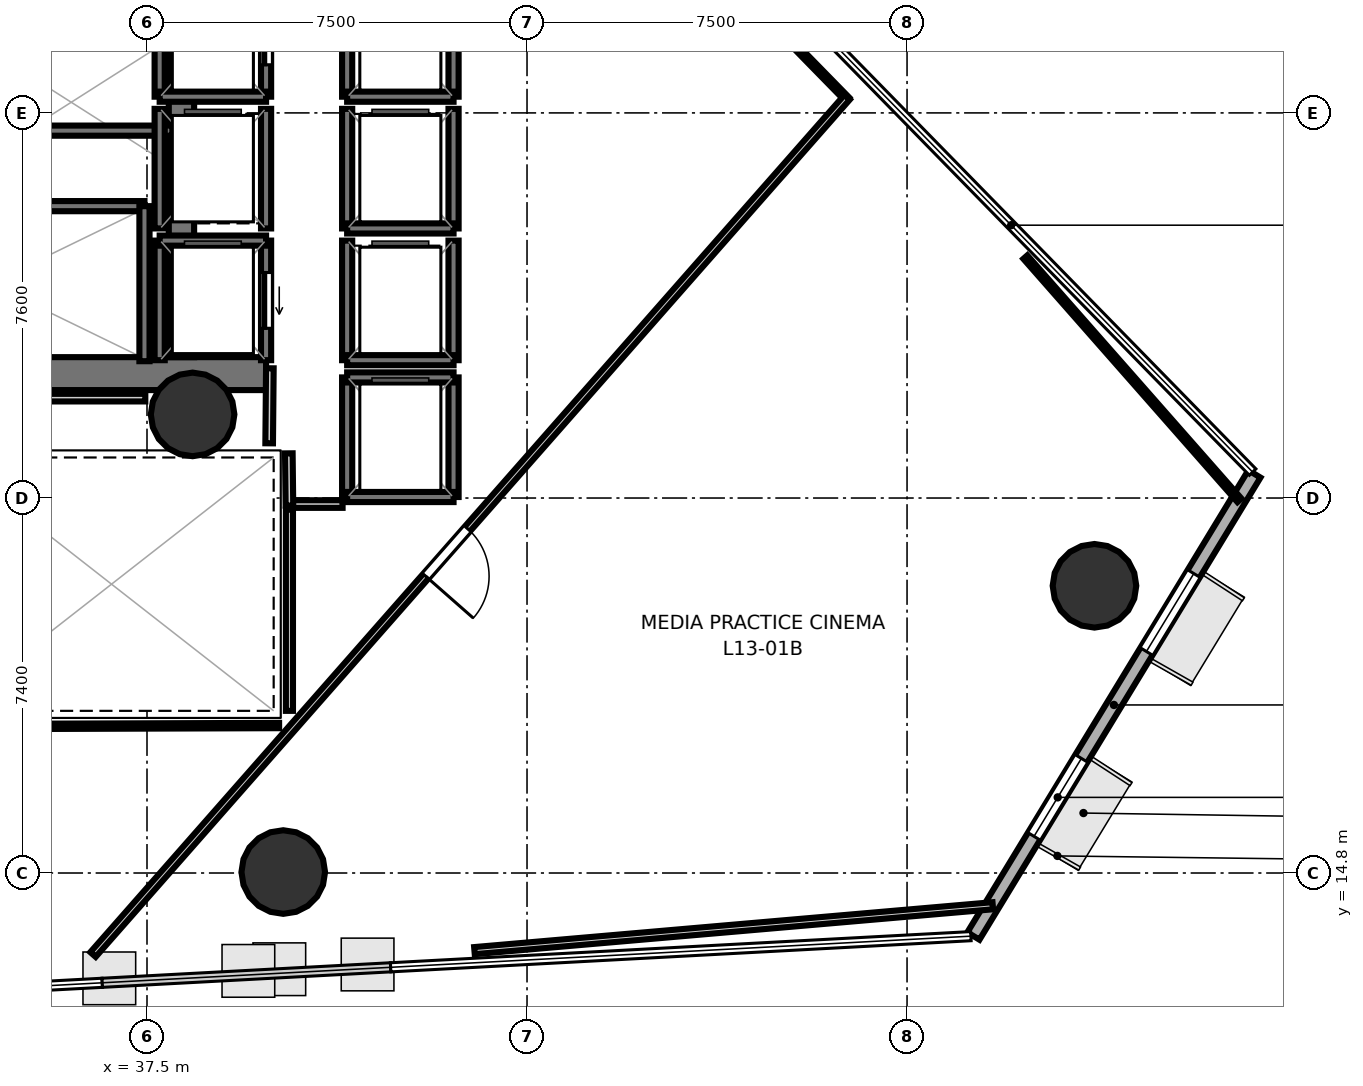
"""IFC4 building model, lengths in metres.
Left out: names, types, materials, properties, quantities, classifications, styles, units other than length and angle.
Written with IfcOpenShell. Run it as: python <this file> out.ifc"""

import sys

from ifc_helpers import new_model, si_unit, direction, frame, frame_2d, origin, origin_2d, place, context, subcontext, project, spatial, rectangle, hollow_circle, extrude, element, fill, save


model = new_model("IFC4")
c1 = context("Model", 3, precision=1e-05, world=origin(), true_north=direction((0.0, 1.0)))
c2 = subcontext(c1, "Body", "Model", "MODEL_VIEW")
j1 = project(units=[si_unit("LENGTHUNIT", "METRE"), si_unit("PLANEANGLEUNIT", "RADIAN")], contexts=[c1])
p1 = place(None, origin())
s1 = spatial("IfcSite", under=j1, at=p1, CompositionType="ELEMENT")
p2 = place(p1, origin())
s2 = spatial("IfcBuilding", under=s1, at=p2, CompositionType="ELEMENT")
p3 = place(p2, frame((0.0, 0.0, 56.2)))
s3 = spatial("IfcBuildingStorey", under=s2, at=p3, CompositionType="ELEMENT", Elevation=56.2)
p4 = place(p3, frame((29.13, 24.655, 0.0), z_axis=(0.0, 0.0, 1.0), x_axis=(1.0, 0.0, 0.0)))
e1 = element("IfcWall", 1, at=p4, inside=s3, PredefinedType="SHEAR", context=c2, shape_type="SweptSolid", body=[
    extrude(rectangle(XDim=10.72, YDim=0.65, at=frame_2d((5.36, 0.0))), origin(), (0.0, 0.0, 1.0), 3.52),
])
p5 = place(p4, frame((0.895, 0.0, 0.0)))
e2 = element("IfcOpeningElement", 2, at=p5, cuts=e1, PredefinedType="OPENING", context=c2, shape_type="SweptSolid", body=[
    extrude(rectangle(XDim=1.25, YDim=2.15, at=frame_2d((0.625, 1.075))), frame((0.0, 0.335, 0.0), z_axis=(0.0, -1.0, 0.0), x_axis=(1.0, 0.0, 0.0)), (0.0, 0.0, 1.0), 0.67),
])
p6 = place(p3, frame((38.18, 24.98, 0.0), z_axis=(0.0, 0.0, 1.0), x_axis=(0.0, 1.0, 0.0)))
e3 = element("IfcWall", 3, at=p6, inside=s3, PredefinedType="SHEAR", context=c2, shape_type="SweptSolid", body=[
    extrude(rectangle(XDim=7.44, YDim=0.5, at=frame_2d((3.72, 0.0))), origin(), (0.0, 0.0, 1.0), 3.52),
])
for number, where, z_axis, x_axis in (
    (4, (38.4, 23.85, 0.0), (0.0, 0.0, 1.0), (1.0, 0.0, 0.0)),
    (5, (56.199, 20.468, 0.0), (0.0, 0.0, 1.0), (1.0, 0.0, 0.0)),
    (6, (40.189, 14.819, 0.0), (0.0, 0.0, 1.0), (1.0, 0.0, 0.0)),
):
    element("IfcColumn", number, at=place(p3, frame(where, z_axis=z_axis, x_axis=x_axis)), inside=s3, PredefinedType="COLUMN", context=c2, shape_type="SweptSolid", body=[
        extrude(hollow_circle(Radius=0.825, WallThickness=0.04, at=origin_2d()), origin(), (0.0, 0.0, 1.0), 3.7),
    ])
p7 = place(p3, frame((53.81, 13.556, 0.0), z_axis=(0.0, 0.0, 1.0), x_axis=(0.51955578319, 0.854436532549, 0.0)))
e7 = element("IfcWall", 7, at=p7, inside=s3, PredefinedType="SOLIDWALL", context=c2, shape_type="SweptSolid", body=[
    extrude(rectangle(XDim=10.674, YDim=0.28, at=frame_2d((5.337, 0.0))), origin(), (0.0, 0.0, 1.0), 3.52),
])
p8 = place(p7, frame((2.302, 0.0, 0.85)))
e8 = element("IfcOpeningElement", 8, at=p8, cuts=e7, PredefinedType="OPENING", context=c2, shape_type="SweptSolid", body=[
    extrude(rectangle(XDim=1.8, YDim=2.1, at=frame_2d((0.9, 1.05))), frame((0.0, 0.15, 0.0), z_axis=(0.0, -1.0, 0.0), x_axis=(1.0, 0.0, 0.0)), (0.0, 0.0, 1.0), 0.3),
])
p9 = place(p7, frame((6.572, 0.0, 0.85)))
e9 = element("IfcOpeningElement", 9, at=p9, cuts=e7, PredefinedType="OPENING", context=c2, shape_type="SweptSolid", body=[
    extrude(rectangle(XDim=1.8, YDim=2.1, at=frame_2d((0.9, 1.05))), frame((0.0, 0.15, 0.0), z_axis=(0.0, -1.0, 0.0), x_axis=(1.0, 0.0, 0.0)), (0.0, 0.0, 1.0), 0.3),
])
p10 = place(p3, frame((29.7, 29.45, 0.0), z_axis=(0.0, 0.0, 1.0), x_axis=(1.0, 0.0, 0.0)))
e10 = element("IfcWall", 10, at=p10, inside=s3, PredefinedType="SOLIDWALL", context=c2, shape_type="SweptSolid", body=[
    extrude(rectangle(XDim=8.3, YDim=0.2, at=frame_2d((4.15, 0.0))), origin(), (0.0, 0.0, 1.0), 3.52),
])
p11 = place(p3, frame((29.7, 27.96, 0.0), z_axis=(0.0, 0.0, 1.0), x_axis=(1.0, 0.0, 0.0)))
e11 = element("IfcWall", 11, at=p11, inside=s3, PredefinedType="SOLIDWALL", context=c2, shape_type="SweptSolid", body=[
    extrude(rectangle(XDim=7.75, YDim=0.2, at=frame_2d((3.875, 0.0))), origin(), (0.0, 0.0, 1.0), 3.52),
])
p12 = place(p3, frame((37.45, 24.9, 0.0), z_axis=(0.0, 0.0, 1.0), x_axis=(0.0, 1.0, 0.0)))
e12 = element("IfcWall", 12, at=p12, inside=s3, PredefinedType="SOLIDWALL", context=c2, shape_type="SweptSolid", body=[
    extrude(rectangle(XDim=3.06, YDim=0.2, at=frame_2d((1.53, 0.0))), origin(), (0.0, 0.0, 1.0), 3.52),
])
p13 = place(p3, frame((39.85, 30.12, 0.0), z_axis=(0.0, 0.0, 1.0), x_axis=(0.0, 1.0, 0.0)))
e13 = element("IfcWall", 13, at=p13, inside=s3, PredefinedType="SOLIDWALL", context=c2, shape_type="SweptSolid", body=[
    extrude(rectangle(XDim=2.36, YDim=0.2, at=frame_2d((1.18, 0.0))), origin(), (0.0, 0.0, 1.0), 3.52),
])
p14 = place(p13, frame((0.63, 0.0, 0.0)))
e14 = element("IfcOpeningElement", 14, at=p14, cuts=e13, PredefinedType="OPENING", context=c2, shape_type="SweptSolid", body=[
    extrude(rectangle(XDim=1.1, YDim=2.15, at=frame_2d((0.55, 1.075))), frame((0.0, 0.11, 0.0), z_axis=(0.0, -1.0, 0.0), x_axis=(1.0, 0.0, 0.0)), (0.0, 0.0, 1.0), 0.22),
])
p15 = place(p3, frame((37.75, 30.12, 0.0), z_axis=(0.0, 0.0, 1.0), x_axis=(0.0, 1.0, 0.0)))
e15 = element("IfcWall", 15, at=p15, inside=s3, PredefinedType="SOLIDWALL", context=c2, shape_type="SweptSolid", body=[
    extrude(rectangle(XDim=2.36, YDim=0.2, at=frame_2d((1.18, 0.0))), origin(), (0.0, 0.0, 1.0), 3.52),
])
p16 = place(p3, frame((37.75, 30.12, 0.0), z_axis=(0.0, 0.0, 1.0), x_axis=(1.0, 0.0, 0.0)))
e16 = element("IfcWall", 16, at=p16, inside=s3, PredefinedType="SOLIDWALL", context=c2, shape_type="SweptSolid", body=[
    extrude(rectangle(XDim=2.1, YDim=0.2, at=frame_2d((1.05, 0.0))), origin(), (0.0, 0.0, 1.0), 3.52),
])
p17 = place(p3, frame((39.85, 24.92, 0.0), z_axis=(0.0, 0.0, 1.0), x_axis=(0.0, 1.0, 0.0)))
e17 = element("IfcWall", 17, at=p17, inside=s3, PredefinedType="SOLIDWALL", context=c2, shape_type="SweptSolid", body=[
    extrude(rectangle(XDim=2.36, YDim=0.2, at=frame_2d((1.18, 0.0))), origin(), (0.0, 0.0, 1.0), 3.52),
])
p18 = place(p17, frame((0.63, 0.0, 0.0)))
e18 = element("IfcOpeningElement", 18, at=p18, cuts=e17, PredefinedType="OPENING", context=c2, shape_type="SweptSolid", body=[
    extrude(rectangle(XDim=1.1, YDim=2.15, at=frame_2d((0.55, 1.075))), frame((0.0, 0.11, 0.0), z_axis=(0.0, -1.0, 0.0), x_axis=(1.0, 0.0, 0.0)), (0.0, 0.0, 1.0), 0.22),
])
p19 = place(p3, frame((37.75, 24.92, 0.0), z_axis=(0.0, 0.0, 1.0), x_axis=(0.0, 1.0, 0.0)))
e19 = element("IfcWall", 19, at=p19, inside=s3, PredefinedType="SOLIDWALL", context=c2, shape_type="SweptSolid", body=[
    extrude(rectangle(XDim=2.36, YDim=0.2, at=frame_2d((1.18, 0.0))), origin(), (0.0, 0.0, 1.0), 3.52),
])
p20 = place(p3, frame((37.75, 27.28, 0.0), z_axis=(0.0, 0.0, 1.0), x_axis=(1.0, 0.0, 0.0)))
e20 = element("IfcWall", 20, at=p20, inside=s3, PredefinedType="SOLIDWALL", context=c2, shape_type="SweptSolid", body=[
    extrude(rectangle(XDim=2.1, YDim=0.2, at=frame_2d((1.05, 0.0))), origin(), (0.0, 0.0, 1.0), 3.52),
])
for number, where, z_axis, x_axis in (
    (21, (43.55, 30.12, 0.0), (0.0, 0.0, 1.0), (0.0, 1.0, 0.0)),
    (22, (41.45, 30.12, 0.0), (0.0, 0.0, 1.0), (0.0, 1.0, 0.0)),
):
    element("IfcWall", number, at=place(p3, frame(where, z_axis=z_axis, x_axis=x_axis)), inside=s3, PredefinedType="SOLIDWALL", context=c2, shape_type="SweptSolid", body=[
        extrude(rectangle(XDim=2.36, YDim=0.2, at=frame_2d((1.18, 0.0))), origin(), (0.0, 0.0, 1.0), 3.52),
    ])
p21 = place(p3, frame((41.45, 30.12, 0.0), z_axis=(0.0, 0.0, 1.0), x_axis=(1.0, 0.0, 0.0)))
e23 = element("IfcWall", 23, at=p21, inside=s3, PredefinedType="SOLIDWALL", context=c2, shape_type="SweptSolid", body=[
    extrude(rectangle(XDim=2.1, YDim=0.2, at=frame_2d((1.05, 0.0))), origin(), (0.0, 0.0, 1.0), 3.52),
])
for number, where, z_axis, x_axis in (
    (24, (43.55, 27.52, 0.0), (0.0, 0.0, 1.0), (0.0, 1.0, 0.0)),
    (25, (41.45, 27.52, 0.0), (0.0, 0.0, 1.0), (0.0, 1.0, 0.0)),
):
    element("IfcWall", number, at=place(p3, frame(where, z_axis=z_axis, x_axis=x_axis)), inside=s3, PredefinedType="SOLIDWALL", context=c2, shape_type="SweptSolid", body=[
        extrude(rectangle(XDim=2.36, YDim=0.2, at=frame_2d((1.18, 0.0))), origin(), (0.0, 0.0, 1.0), 3.52),
    ])
p22 = place(p3, frame((41.45, 27.52, 0.0), z_axis=(0.0, 0.0, 1.0), x_axis=(1.0, 0.0, 0.0)))
e26 = element("IfcWall", 26, at=p22, inside=s3, PredefinedType="SOLIDWALL", context=c2, shape_type="SweptSolid", body=[
    extrude(rectangle(XDim=2.1, YDim=0.2, at=frame_2d((1.05, 0.0))), origin(), (0.0, 0.0, 1.0), 3.52),
])
for number, where, z_axis, x_axis in (
    (27, (43.55, 24.92, 0.0), (0.0, 0.0, 1.0), (0.0, 1.0, 0.0)),
    (28, (41.45, 24.92, 0.0), (0.0, 0.0, 1.0), (0.0, 1.0, 0.0)),
):
    element("IfcWall", number, at=place(p3, frame(where, z_axis=z_axis, x_axis=x_axis)), inside=s3, PredefinedType="SOLIDWALL", context=c2, shape_type="SweptSolid", body=[
        extrude(rectangle(XDim=2.36, YDim=0.2, at=frame_2d((1.18, 0.0))), origin(), (0.0, 0.0, 1.0), 3.52),
    ])
p23 = place(p3, frame((41.45, 24.92, 0.0), z_axis=(0.0, 0.0, 1.0), x_axis=(1.0, 0.0, 0.0)))
e29 = element("IfcWall", 29, at=p23, inside=s3, PredefinedType="SOLIDWALL", context=c2, shape_type="SweptSolid", body=[
    extrude(rectangle(XDim=2.1, YDim=0.2, at=frame_2d((1.05, 0.0))), origin(), (0.0, 0.0, 1.0), 3.52),
])
for number, where, z_axis, x_axis in (
    (30, (39.85, 27.52, 0.0), (0.0, 0.0, 1.0), (0.0, 1.0, 0.0)),
    (31, (37.75, 27.52, 0.0), (0.0, 0.0, 1.0), (0.0, 1.0, 0.0)),
):
    element("IfcWall", number, at=place(p3, frame(where, z_axis=z_axis, x_axis=x_axis)), inside=s3, PredefinedType="SOLIDWALL", context=c2, shape_type="SweptSolid", body=[
        extrude(rectangle(XDim=2.36, YDim=0.2, at=frame_2d((1.18, 0.0))), origin(), (0.0, 0.0, 1.0), 3.52),
    ])
for number, where, z_axis, x_axis in (
    (32, (43.55, 22.22, 0.0), (0.0, 0.0, 1.0), (0.0, 1.0, 0.0)),
    (33, (41.45, 22.22, 0.0), (0.0, 0.0, 1.0), (0.0, 1.0, 0.0)),
):
    element("IfcWall", number, at=place(p3, frame(where, z_axis=z_axis, x_axis=x_axis)), inside=s3, PredefinedType="SOLIDWALL", context=c2, shape_type="SweptSolid", body=[
        extrude(rectangle(XDim=2.36, YDim=0.2, at=frame_2d((1.18, 0.0))), origin(), (0.0, 0.0, 1.0), 3.52),
    ])
for number, where, z_axis, x_axis in (
    (34, (41.45, 24.58, 0.0), (0.0, 0.0, 1.0), (1.0, 0.0, 0.0)),
    (35, (41.45, 22.22, 0.0), (0.0, 0.0, 1.0), (1.0, 0.0, 0.0)),
):
    element("IfcWall", number, at=place(p3, frame(where, z_axis=z_axis, x_axis=x_axis)), inside=s3, PredefinedType="SOLIDWALL", context=c2, shape_type="SweptSolid", body=[
        extrude(rectangle(XDim=2.1, YDim=0.2, at=frame_2d((1.05, 0.0))), origin(), (0.0, 0.0, 1.0), 3.52),
    ])
p24 = place(p3, frame((41.36, 22.081, 0.0), z_axis=(0.0, 0.0, 1.0), x_axis=(-1.0, 0.0, 0.0)))
e36 = element("IfcWall", 36, at=p24, inside=s3, PredefinedType="PARTITIONING", context=c2, shape_type="SweptSolid", body=[
    extrude(rectangle(XDim=1.08, YDim=0.15, at=frame_2d((0.54, 0.0))), origin(), (0.0, 0.0, 1.0), 2.84),
])
p25 = place(p3, frame((40.311, 22.05, 0.0), z_axis=(0.0, 0.0, 1.0), x_axis=(-0.011836292006, 0.999929948642, 0.0)))
e37 = element("IfcWall", 37, at=p25, inside=s3, PredefinedType="PARTITIONING", context=c2, shape_type="SweptSolid", body=[
    extrude(rectangle(XDim=1.031, YDim=0.15, at=frame_2d((0.516, 0.0))), origin(), (0.0, 0.0, 1.0), 2.84),
])
p26 = place(p3, frame((39.911, 23.28, 0.0), z_axis=(0.0, 0.0, 1.0), x_axis=(0.009397771291, 0.999955839972, 0.0)))
e38 = element("IfcWall", 38, at=p26, inside=s3, PredefinedType="PARTITIONING", context=c2, shape_type="SweptSolid", body=[
    extrude(rectangle(XDim=1.481, YDim=0.15, at=frame_2d((0.74, 0.0))), origin(), (0.0, 0.0, 1.0), 2.84),
])
p27 = place(p3, frame((37.467, 24.181, 0.0), z_axis=(0.0, 0.0, 1.0), x_axis=(-1.0, 0.0, 0.0)))
e39 = element("IfcWall", 39, at=p27, inside=s3, PredefinedType="PARTITIONING", context=c2, shape_type="SweptSolid", body=[
    extrude(rectangle(XDim=3.937, YDim=0.15, at=frame_2d((1.968, 0.0))), origin(), (0.0, 0.0, 1.0), 2.84),
])
p28 = place(p3, frame((33.6, 17.689, 0.0), z_axis=(0.0, 0.0, 1.0), x_axis=(0.99999467303, 0.003264033036, 0.0)))
e40 = element("IfcWall", 40, at=p28, inside=s3, PredefinedType="PARTITIONING", context=c2, shape_type="SweptSolid", body=[
    extrude(rectangle(XDim=6.507, YDim=0.105, at=frame_2d((3.254, 0.0))), origin(), (0.0, 0.0, 1.0), 2.84),
])
p29 = place(p3, frame((40.311, 18.0, 0.0), z_axis=(0.0, 0.0, 1.0), x_axis=(0.0, 1.0, 0.0)))
e41 = element("IfcWall", 41, at=p29, inside=s3, PredefinedType="PARTITIONING", context=c2, shape_type="SweptSolid", body=[
    extrude(rectangle(XDim=3.97, YDim=0.14, at=frame_2d((1.985, 0.0))), origin(), (0.0, 0.0, 1.0), 2.84),
])
p30 = place(p3, frame((42.849, 38.728, 0.0), z_axis=(0.0, 0.0, 1.0), x_axis=(0.699253855462, -0.714873447276, 0.0)))
e42 = element("IfcWall", 42, at=p30, inside=s3, PredefinedType="PARTITIONING", context=c2, shape_type="SweptSolid", body=[
    extrude(rectangle(XDim=12.114, YDim=0.105, at=frame_2d((6.057, 0.0))), origin(), (0.0, 0.0, 1.0), 2.798),
])
p31 = place(p3, frame((51.319, 30.11, 0.0), z_axis=(0.0, 0.0, 1.0), x_axis=(-0.660511140623, -0.750816244572, 0.0)))
e43 = element("IfcWall", 43, at=p31, inside=s3, PredefinedType="PARTITIONING", context=c2, shape_type="SweptSolid", body=[
    extrude(rectangle(XDim=22.534, YDim=0.14, at=frame_2d((11.267, 0.0))), origin(), (0.0, 0.0, 1.0), 2.798),
])
p32 = place(p31, frame((11.342, 0.0, 0.0)))
e44 = element("IfcOpeningElement", 44, at=p32, cuts=e43, PredefinedType="OPENING", context=c2, shape_type="SweptSolid", body=[
    extrude(rectangle(XDim=1.25, YDim=2.2, at=frame_2d((0.625, 1.1))), frame((0.0, 0.08, 0.0), z_axis=(0.0, -1.0, 0.0), x_axis=(1.0, 0.0, 0.0)), (0.0, 0.0, 1.0), 0.16),
])
p33 = place(p3, frame((54.192, 14.154, 0.0), z_axis=(0.0, 0.0, 1.0), x_axis=(-0.99627468077, -0.086236653791, 0.0)))
e45 = element("IfcWall", 45, at=p33, inside=s3, PredefinedType="PARTITIONING", context=c2, shape_type="SweptSolid", body=[
    extrude(rectangle(XDim=10.268, YDim=0.14, at=frame_2d((5.134, 0.0))), origin(), (0.0, 0.0, 1.0), 2.84),
])
p34 = place(p3, frame((54.835, 26.955, 0.0), z_axis=(0.0, 0.0, 1.0), x_axis=(0.6607070608, -0.750643843516, 0.0)))
e46 = element("IfcWall", 46, at=p34, inside=s3, PredefinedType="PARTITIONING", context=c2, shape_type="SweptSolid", body=[
    extrude(rectangle(XDim=6.396, YDim=0.105, at=frame_2d((3.198, 0.0))), origin(), (0.0, 0.0, 1.0), 2.84),
])
p35 = place(p14, origin())
e47 = element("IfcDoor", 47, at=p35, inside=s3, OperationType="SLIDING_TO_LEFT", PredefinedType="DOOR", context=c2, shape_type="SweptSolid", body=[
    extrude(rectangle(XDim=1.1, YDim=2.15, at=frame_2d((0.55, 1.075))), frame((0.0, 0.025, 0.0), z_axis=(0.0, -1.0, 0.0), x_axis=(1.0, 0.0, 0.0)), (0.0, 0.0, 1.0), 0.05),
])
fill(e14, e47)
p36 = place(p18, origin())
e48 = element("IfcDoor", 48, at=p36, inside=s3, OperationType="SLIDING_TO_LEFT", PredefinedType="DOOR", context=c2, shape_type="SweptSolid", body=[
    extrude(rectangle(XDim=1.1, YDim=2.15, at=frame_2d((0.55, 1.075))), frame((0.0, 0.025, 0.0), z_axis=(0.0, -1.0, 0.0), x_axis=(1.0, 0.0, 0.0)), (0.0, 0.0, 1.0), 0.05),
])
fill(e18, e48)
p37 = place(p32, origin())
e49 = element("IfcDoor", 49, at=p37, inside=s3, OperationType="SINGLE_SWING_RIGHT", PredefinedType="DOOR", context=c2, shape_type="SweptSolid", body=[
    extrude(rectangle(XDim=1.25, YDim=2.2, at=frame_2d((0.625, 1.1))), frame((0.0, 0.025, 0.0), z_axis=(0.0, -1.0, 0.0), x_axis=(1.0, 0.0, 0.0)), (0.0, 0.0, 1.0), 0.05),
])
fill(e44, e49)
p38 = place(p8, origin())
e50 = element("IfcWindow", 50, at=p38, inside=s3, PartitioningType="SINGLE_PANEL", PredefinedType="WINDOW", context=c2, shape_type="SweptSolid", body=[
    extrude(rectangle(XDim=1.8, YDim=2.1, at=frame_2d((0.9, 1.05))), frame((0.0, 0.03, 0.0), z_axis=(0.0, -1.0, 0.0), x_axis=(1.0, 0.0, 0.0)), (0.0, 0.0, 1.0), 0.06),
])
fill(e8, e50)
p39 = place(p9, origin())
e51 = element("IfcWindow", 51, at=p39, inside=s3, PartitioningType="SINGLE_PANEL", PredefinedType="WINDOW", context=c2, shape_type="SweptSolid", body=[
    extrude(rectangle(XDim=1.8, YDim=2.1, at=frame_2d((0.9, 1.05))), frame((0.0, 0.03, 0.0), z_axis=(0.0, -1.0, 0.0), x_axis=(1.0, 0.0, 0.0)), (0.0, 0.0, 1.0), 0.06),
])
fill(e9, e51)
save(model, sys.argv[1])
